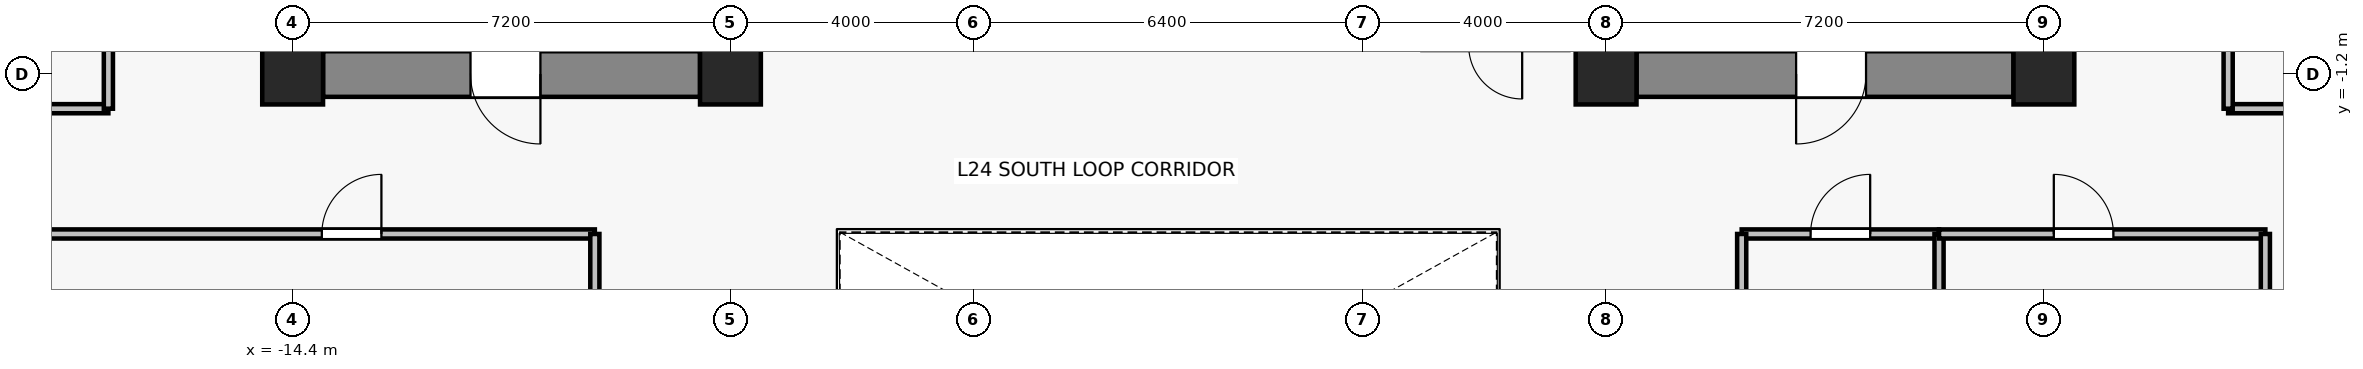
"""IFC4 building model, lengths in metres.
Left out: names, types, materials, properties, quantities, classifications, styles, units other than length and angle.
Written with IfcOpenShell. Run it as: python <this file> out.ifc"""

import sys

from ifc_helpers import new_model, si_unit, direction, frame, frame_2d, origin, origin_2d, place, context, subcontext, project, spatial, rectangle, extrude, source, transform, mapped, element, fill, save


model = new_model("IFC4")
c1 = context("Model", 3, precision=1e-05, world=origin(), true_north=direction((0.0, 1.0)))
c2 = subcontext(c1, "Body", "Model", "MODEL_VIEW")
j1 = project(units=[si_unit("LENGTHUNIT", "METRE"), si_unit("PLANEANGLEUNIT", "RADIAN")], contexts=[c1])
p1 = place(None, origin())
s1 = spatial("IfcSite", under=j1, at=p1, CompositionType="ELEMENT")
p2 = place(p1, origin())
s2 = spatial("IfcBuilding", under=s1, at=p2, CompositionType="ELEMENT")
p3 = place(p2, frame((0.0, 0.0, 90.1)))
s3 = spatial("IfcBuildingStorey", under=s2, at=p3, CompositionType="ELEMENT", Elevation=90.1)
for number, where, z_axis, x_axis in (
    (1, (-14.4, -1.2, 0.0), (0.0, 0.0, 1.0), (1.0, 0.0, 0.0)),
    (2, (-7.2, -1.2, 0.0), (0.0, 0.0, 1.0), (1.0, 0.0, 0.0)),
    (3, (7.2, -1.2, 0.0), (0.0, 0.0, 1.0), (1.0, 0.0, 0.0)),
    (4, (14.4, -1.2, 0.0), (0.0, 0.0, 1.0), (1.0, 0.0, 0.0)),
):
    element("IfcColumn", number, at=place(p3, frame(where, z_axis=z_axis, x_axis=x_axis)), inside=s3, PredefinedType="COLUMN", context=c2, shape_type="SweptSolid", body=[
        extrude(rectangle(XDim=1.0, YDim=1.0, at=origin_2d()), origin(), (0.0, 0.0, 1.0), 3.3),
    ])
p4 = place(p3, frame((-7.7, -1.2, 0.0), z_axis=(0.0, 0.0, 1.0), x_axis=(-1.0, 0.0, 0.0)))
e5 = element("IfcWall", 5, at=p4, inside=s3, PredefinedType="SHEAR", context=c2, shape_type="SweptSolid", body=[
    extrude(rectangle(XDim=6.2, YDim=0.75, at=frame_2d((3.1, 0.0))), origin(), (0.0, 0.0, 1.0), 3.075),
])
p5 = place(p4, frame((2.625, 0.0, 0.0)))
e6 = element("IfcOpeningElement", 6, at=p5, cuts=e5, PredefinedType="OPENING", context=c2, shape_type="SweptSolid", body=[
    extrude(rectangle(XDim=1.15, YDim=2.15, at=frame_2d((0.575, 1.075))), frame((0.0, 0.385, 0.0), z_axis=(0.0, -1.0, 0.0), x_axis=(1.0, 0.0, 0.0)), (0.0, 0.0, 1.0), 0.77),
])
p6 = place(p3, frame((13.9, -1.2, 0.0), z_axis=(0.0, 0.0, 1.0), x_axis=(-1.0, 0.0, 0.0)))
e7 = element("IfcWall", 7, at=p6, inside=s3, PredefinedType="SHEAR", context=c2, shape_type="SweptSolid", body=[
    extrude(rectangle(XDim=6.2, YDim=0.75, at=frame_2d((3.1, 0.0))), origin(), (0.0, 0.0, 1.0), 3.075),
])
p7 = place(p6, frame((2.425, 0.0, 0.0)))
e8 = element("IfcOpeningElement", 8, at=p7, cuts=e7, PredefinedType="OPENING", context=c2, shape_type="SweptSolid", body=[
    extrude(rectangle(XDim=1.15, YDim=2.15, at=frame_2d((0.575, 1.075))), frame((0.0, 0.385, 0.0), z_axis=(0.0, -1.0, 0.0), x_axis=(1.0, 0.0, 0.0)), (0.0, 0.0, 1.0), 0.77),
])
p8 = place(p3, frame((-29.53, -3.83, 0.0), z_axis=(0.0, 0.0, 1.0), x_axis=(1.0, 0.0, 0.0)))
e9 = element("IfcWall", 9, at=p8, inside=s3, PredefinedType="PARTITIONING", context=c2, shape_type="SweptSolid", body=[
    extrude(rectangle(XDim=20.1, YDim=0.15, at=frame_2d((10.05, 0.0))), origin(), (0.0, 0.0, 1.0), 2.515),
])
p9 = place(p8, frame((15.61, 0.0, 0.0)))
e10 = element("IfcOpeningElement", 10, at=p9, cuts=e9, PredefinedType="OPENING", context=c2, shape_type="SweptSolid", body=[
    extrude(rectangle(XDim=0.98, YDim=2.15, at=frame_2d((0.49, 1.075))), frame((0.0, 0.085, 0.0), z_axis=(0.0, -1.0, 0.0), x_axis=(1.0, 0.0, 0.0)), (0.0, 0.0, 1.0), 0.17),
])
p10 = place(p3, frame((-9.43, -3.83, 0.0), z_axis=(0.0, 0.0, 1.0), x_axis=(0.0, -1.0, 0.0)))
e11 = element("IfcWall", 11, at=p10, inside=s3, PredefinedType="PARTITIONING", context=c2, shape_type="SweptSolid", body=[
    extrude(rectangle(XDim=9.29, YDim=0.15, at=frame_2d((4.645, 0.0))), origin(), (0.0, 0.0, 1.0), 2.515),
])
p11 = place(p3, frame((9.43, -3.83, 0.0), z_axis=(0.0, 0.0, 1.0), x_axis=(1.0, 0.0, 0.0)))
e12 = element("IfcWall", 12, at=p11, inside=s3, PredefinedType="PARTITIONING", context=c2, shape_type="SweptSolid", body=[
    extrude(rectangle(XDim=3.245, YDim=0.15, at=frame_2d((1.623, 0.0))), origin(), (0.0, 0.0, 1.0), 3.075),
])
p12 = place(p11, frame((1.133, 0.0, 0.0)))
e13 = element("IfcOpeningElement", 13, at=p12, cuts=e12, PredefinedType="OPENING", context=c2, shape_type="SweptSolid", body=[
    extrude(rectangle(XDim=0.98, YDim=2.15, at=frame_2d((0.49, 1.075))), frame((0.0, 0.085, 0.0), z_axis=(0.0, -1.0, 0.0), x_axis=(1.0, 0.0, 0.0)), (0.0, 0.0, 1.0), 0.17),
])
for number, where, z_axis, x_axis in (
    (14, (9.43, -13.12, 0.0), (0.0, 0.0, 1.0), (0.0, 1.0, 0.0)),
    (15, (12.675, -3.83, 0.0), (0.0, 0.0, 1.0), (0.0, -1.0, 0.0)),
):
    element("IfcWall", number, at=place(p3, frame(where, z_axis=z_axis, x_axis=x_axis)), inside=s3, PredefinedType="PARTITIONING", context=c2, shape_type="SweptSolid", body=[
        extrude(rectangle(XDim=9.29, YDim=0.15, at=frame_2d((4.645, 0.0))), origin(), (0.0, 0.0, 1.0), 2.515),
    ])
p13 = place(p3, frame((12.675, -3.83, 0.0), z_axis=(0.0, 0.0, 1.0), x_axis=(1.0, 0.0, 0.0)))
e16 = element("IfcWall", 16, at=p13, inside=s3, PredefinedType="PARTITIONING", context=c2, shape_type="SweptSolid", body=[
    extrude(rectangle(XDim=5.367, YDim=0.15, at=frame_2d((2.683, 0.0))), origin(), (0.0, 0.0, 1.0), 2.515),
])
p14 = place(p13, frame((1.888, 0.0, 0.0)))
e17 = element("IfcOpeningElement", 17, at=p14, cuts=e16, PredefinedType="OPENING", context=c2, shape_type="SweptSolid", body=[
    extrude(rectangle(XDim=0.98, YDim=2.15, at=frame_2d((0.49, 1.075))), frame((0.0, 0.085, 0.0), z_axis=(0.0, -1.0, 0.0), x_axis=(1.0, 0.0, 0.0)), (0.0, 0.0, 1.0), 0.17),
])
p15 = place(p3, frame((18.042, -3.83, 0.0), z_axis=(0.0, 0.0, 1.0), x_axis=(0.0, -1.0, 0.0)))
e18 = element("IfcWall", 18, at=p15, inside=s3, PredefinedType="PARTITIONING", context=c2, shape_type="SweptSolid", body=[
    extrude(rectangle(XDim=9.29, YDim=0.15, at=frame_2d((4.645, 0.0))), origin(), (0.0, 0.0, 1.0), 2.515),
])
p16 = place(p3, frame((-17.43, -1.77, 0.0), z_axis=(0.0, 0.0, 1.0), x_axis=(-1.0, 0.0, 0.0)))
e19 = element("IfcWall", 19, at=p16, inside=s3, PredefinedType="PARTITIONING", context=c2, shape_type="SweptSolid", body=[
    extrude(rectangle(XDim=12.1, YDim=0.15, at=frame_2d((6.05, 0.0))), origin(), (0.0, 0.0, 1.0), 2.515),
])
p17 = place(p3, frame((-17.43, 3.965, 0.0), z_axis=(0.0, 0.0, 1.0), x_axis=(0.0, -1.0, 0.0)))
e20 = element("IfcWall", 20, at=p17, inside=s3, PredefinedType="PARTITIONING", context=c2, shape_type="SweptSolid", body=[
    extrude(rectangle(XDim=5.735, YDim=0.15, at=frame_2d((2.867, 0.0))), origin(), (0.0, 0.0, 1.0), 2.515),
])
p18 = place(p17, frame((2.377, 0.0, 0.0)))
e21 = element("IfcOpeningElement", 21, at=p18, cuts=e20, PredefinedType="OPENING", context=c2, shape_type="SweptSolid", body=[
    extrude(rectangle(XDim=0.98, YDim=2.15, at=frame_2d((0.49, 1.075))), frame((0.0, 0.085, 0.0), z_axis=(0.0, -1.0, 0.0), x_axis=(1.0, 0.0, 0.0)), (0.0, 0.0, 1.0), 0.17),
])
p19 = place(p3, frame((25.53, -1.77, 0.0), z_axis=(0.0, 0.0, 1.0), x_axis=(-1.0, 0.0, 0.0)))
e22 = element("IfcWall", 22, at=p19, inside=s3, PredefinedType="PARTITIONING", context=c2, shape_type="SweptSolid", body=[
    extrude(rectangle(XDim=8.1, YDim=0.15, at=frame_2d((4.05, 0.0))), origin(), (0.0, 0.0, 1.0), 2.515),
])
p20 = place(p3, frame((17.43, -1.77, 0.0), z_axis=(0.0, 0.0, 1.0), x_axis=(0.0, 1.0, 0.0)))
e23 = element("IfcWall", 23, at=p20, inside=s3, PredefinedType="PARTITIONING", context=c2, shape_type="SweptSolid", body=[
    extrude(rectangle(XDim=15.65, YDim=0.15, at=frame_2d((7.825, 0.0))), origin(), (0.0, 0.0, 1.0), 2.515),
])
p21 = place(p20, frame((7.335, 0.0, 0.0)))
e24 = element("IfcOpeningElement", 24, at=p21, cuts=e23, PredefinedType="OPENING", context=c2, shape_type="SweptSolid", body=[
    extrude(rectangle(XDim=0.98, YDim=2.15, at=frame_2d((0.49, 1.075))), frame((0.0, 0.085, 0.0), z_axis=(0.0, -1.0, 0.0), x_axis=(1.0, 0.0, 0.0)), (0.0, 0.0, 1.0), 0.17),
])
m1 = source(origin(), c2, "Body", "SweptSolid", [
    extrude(rectangle(XDim=1.15, YDim=2.15, at=frame_2d((0.575, 1.075))), frame((0.0, 0.025, 0.0), z_axis=(0.0, -1.0, 0.0), x_axis=(1.0, 0.0, 0.0)), (0.0, 0.0, 1.0), 0.05),
])
p22 = place(p5, origin())
e25 = element("IfcDoor", 25, at=p22, inside=s3, OperationType="SINGLE_SWING_LEFT", PredefinedType="DOOR", context=c2, shape_type="MappedRepresentation", body=[
    mapped(m1, transform((0.0, 0.0, 0.0), x_axis=(1.0, 0.0, 0.0), y_axis=(0.0, 1.0, 0.0), z_axis=(0.0, 0.0, 1.0), scale=1.0)),
])
fill(e6, e25)
p23 = place(p7, origin())
e26 = element("IfcDoor", 26, at=p23, inside=s3, OperationType="SINGLE_SWING_RIGHT", PredefinedType="DOOR", context=c2, shape_type="MappedRepresentation", body=[
    mapped(m1, transform((0.0, 0.0, 0.0), x_axis=(1.0, 0.0, 0.0), y_axis=(0.0, 1.0, 0.0), z_axis=(0.0, 0.0, 1.0), scale=1.0)),
])
fill(e8, e26)
m2 = source(origin(), c2, "Body", "SweptSolid", [
    extrude(rectangle(XDim=0.98, YDim=2.15, at=frame_2d((0.49, 1.075))), frame((0.0, 0.025, 0.0), z_axis=(0.0, -1.0, 0.0), x_axis=(1.0, 0.0, 0.0)), (0.0, 0.0, 1.0), 0.05),
])
p24 = place(p9, origin())
e27 = element("IfcDoor", 27, at=p24, inside=s3, OperationType="SINGLE_SWING_RIGHT", PredefinedType="DOOR", context=c2, shape_type="MappedRepresentation", body=[
    mapped(m2, transform((0.0, 0.0, 0.0), x_axis=(1.0, 0.0, 0.0), y_axis=(0.0, 1.0, 0.0), z_axis=(0.0, 0.0, 1.0), scale=1.0)),
])
fill(e10, e27)
p25 = place(p12, origin())
e28 = element("IfcDoor", 28, at=p25, inside=s3, OperationType="SINGLE_SWING_RIGHT", PredefinedType="DOOR", context=c2, shape_type="MappedRepresentation", body=[
    mapped(m2, transform((0.0, 0.0, 0.0), x_axis=(1.0, 0.0, 0.0), y_axis=(0.0, 1.0, 0.0), z_axis=(0.0, 0.0, 1.0), scale=1.0)),
])
fill(e13, e28)
p26 = place(p14, origin())
e29 = element("IfcDoor", 29, at=p26, inside=s3, OperationType="SINGLE_SWING_LEFT", PredefinedType="DOOR", context=c2, shape_type="MappedRepresentation", body=[
    mapped(m2, transform((0.0, 0.0, 0.0), x_axis=(1.0, 0.0, 0.0), y_axis=(0.0, 1.0, 0.0), z_axis=(0.0, 0.0, 1.0), scale=1.0)),
])
fill(e17, e29)
save(model, sys.argv[1])
